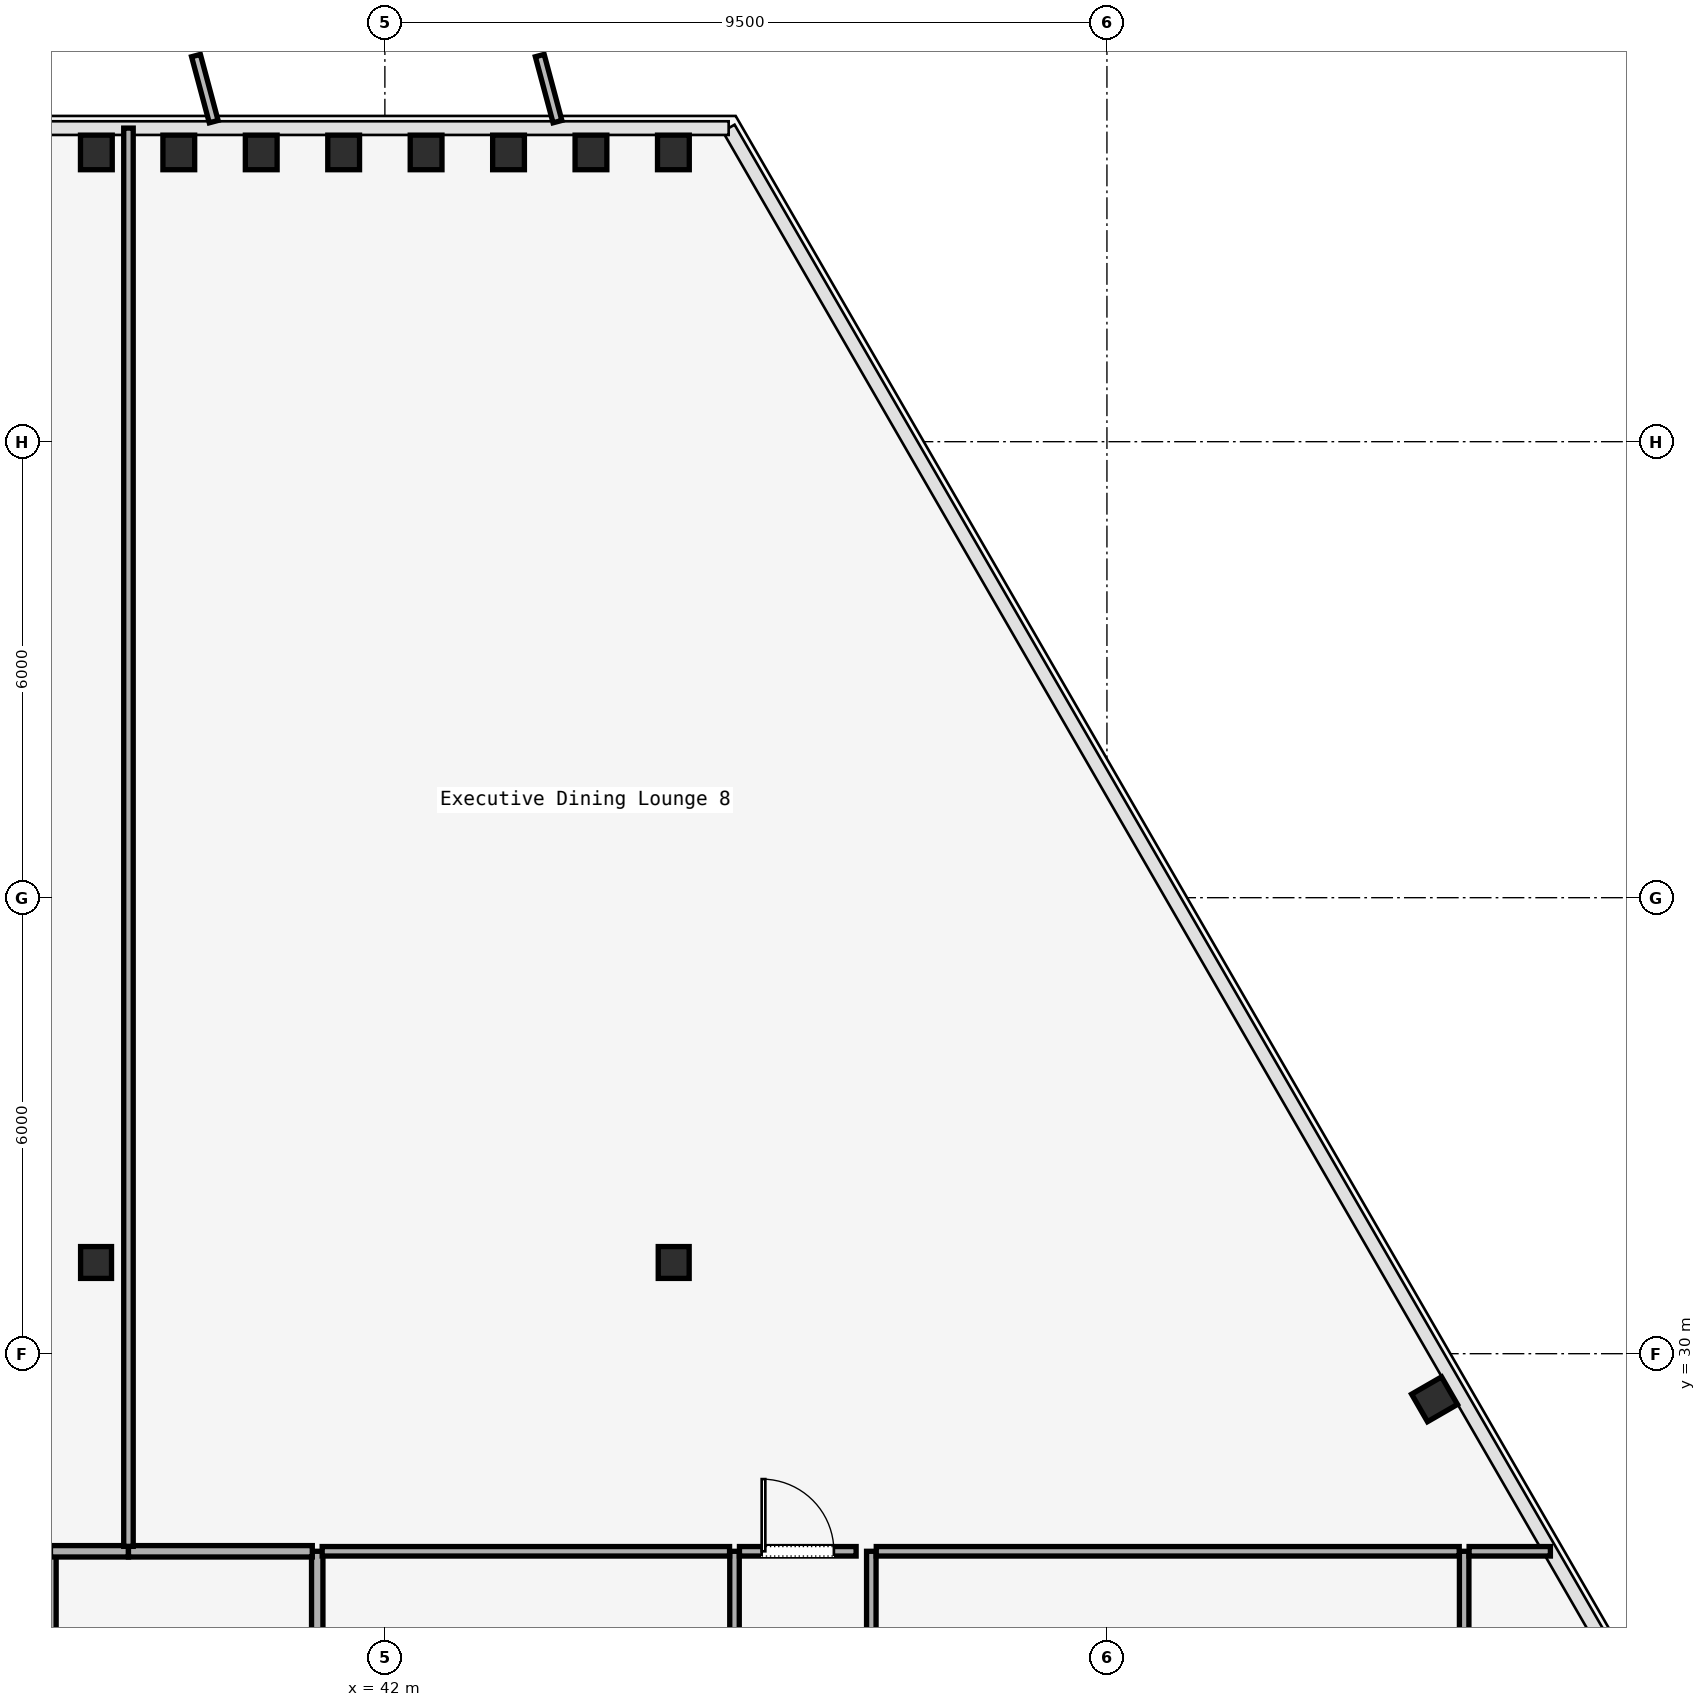
"""IFC4 building model, lengths in metres.
Left out: names, types, materials, properties, quantities, classifications, styles, units other than length and angle.
Written with IfcOpenShell. Run it as: python <this file> out.ifc"""

import sys

from ifc_helpers import new_model, si_unit, direction, frame, frame_2d, origin, origin_2d, place, context, subcontext, project, spatial, rectangle, i_section, extrude, element, fill, save


model = new_model("IFC4")
c1 = context("Model", 3, precision=1e-05, world=origin(), true_north=direction((0.0, 1.0)))
c2 = subcontext(c1, "Body", "Model", "MODEL_VIEW")
j1 = project(units=[si_unit("LENGTHUNIT", "METRE"), si_unit("PLANEANGLEUNIT", "RADIAN")], contexts=[c1])
p1 = place(None, origin())
s1 = spatial("IfcSite", under=j1, at=p1, CompositionType="ELEMENT")
p2 = place(p1, origin())
s2 = spatial("IfcBuilding", under=s1, at=p2, CompositionType="ELEMENT")
p3 = place(p2, frame((0.0, 0.0, 195.4)))
s3 = spatial("IfcBuildingStorey", under=s2, at=p3, CompositionType="ELEMENT", Elevation=195.4)
for number, where, z_axis, x_axis in (
    (1, (38.2, 31.2, 0.0), (0.0, 0.0, 1.0), (1.0, 0.0, 0.0)),
    (2, (45.8, 31.2, 0.0), (0.0, 0.0, 1.0), (1.0, 0.0, 0.0)),
):
    element("IfcColumn", number, at=place(p3, frame(where, z_axis=z_axis, x_axis=x_axis)), inside=s3, PredefinedType="COLUMN", context=c2, shape_type="SweptSolid", body=[
        extrude(i_section(OverallWidth=0.407, OverallDepth=0.419, WebThickness=0.031, FlangeThickness=0.049, FilletRadius=0.015, at=origin_2d()), origin(), (0.0, 0.0, 1.0), 3.58),
    ])
for number, where, z_axis, x_axis in (
    (3, (55.81, 29.4, 0.0), (0.0, 0.0, 1.0), (-0.5, 0.866, 0.0)),
    (4, (45.796, 45.806, 0.0), (0.0, 0.0, 1.0), (1.0, 0.0, 0.0)),
    (5, (44.711, 45.806, 0.0), (0.0, 0.0, 1.0), (1.0, 0.0, 0.0)),
    (6, (43.627, 45.806, 0.0), (0.0, 0.0, 1.0), (1.0, 0.0, 0.0)),
    (7, (42.542, 45.806, 0.0), (0.0, 0.0, 1.0), (1.0, 0.0, 0.0)),
    (8, (41.458, 45.806, 0.0), (0.0, 0.0, 1.0), (1.0, 0.0, 0.0)),
    (9, (40.373, 45.806, 0.0), (0.0, 0.0, 1.0), (1.0, 0.0, 0.0)),
    (10, (39.289, 45.806, 0.0), (0.0, 0.0, 1.0), (1.0, 0.0, 0.0)),
    (11, (38.204, 45.806, 0.0), (0.0, 0.0, 1.0), (1.0, 0.0, 0.0)),
):
    element("IfcColumn", number, at=place(p3, frame(where, z_axis=z_axis, x_axis=x_axis)), inside=s3, PredefinedType="COLUMN", context=c2, shape_type="SweptSolid", body=[
        extrude(i_section(OverallWidth=0.418, OverallDepth=0.455, WebThickness=0.042, FlangeThickness=0.052, FilletRadius=0.015, at=origin_2d()), origin(), (0.0, 0.0, 1.0), 3.58),
    ])
p4 = place(p3, frame((37.6, 27.335, 0.0), z_axis=(0.0, 0.0, 1.0), x_axis=(0.0, -1.0, 0.0)))
e12 = element("IfcWall", 12, at=p4, inside=s3, PredefinedType="PARTITIONING", context=c2, shape_type="SweptSolid", body=[
    extrude(rectangle(XDim=6.279, YDim=0.15, at=frame_2d((3.14, 0.0))), origin(), (0.0, 0.0, 1.0), 3.01),
])
p5 = place(p4, frame((2.665, 0.0, 0.0)))
e13 = element("IfcOpeningElement", 13, at=p5, cuts=e12, PredefinedType="OPENING", context=c2, shape_type="SweptSolid", body=[
    extrude(rectangle(XDim=0.95, YDim=2.2, at=frame_2d((0.475, 1.1))), frame((0.0, 0.075, 0.0), z_axis=(0.0, -1.0, 0.0), x_axis=(1.0, 0.0, 0.0)), (0.0, 0.0, 1.0), 0.15),
])
p6 = place(p3, frame((46.6, 23.53, 0.0), z_axis=(0.0, 0.0, 1.0), x_axis=(0.0, 1.0, 0.0)))
e14 = element("IfcWall", 14, at=p6, inside=s3, PredefinedType="PARTITIONING", context=c2, shape_type="SweptSolid", body=[
    extrude(rectangle(XDim=3.87, YDim=0.125, at=frame_2d((1.935, 0.0))), origin(), (0.0, 0.0, 1.0), 3.01),
])
p7 = place(p6, frame((1.46, 0.0, 0.0)))
e15 = element("IfcOpeningElement", 15, at=p7, cuts=e14, PredefinedType="OPENING", context=c2, shape_type="SweptSolid", body=[
    extrude(rectangle(XDim=0.95, YDim=2.2, at=frame_2d((0.475, 1.1))), frame((0.0, 0.062, 0.0), z_axis=(0.0, -1.0, 0.0), x_axis=(1.0, 0.0, 0.0)), (0.0, 0.0, 1.0), 0.125),
])
p8 = place(p3, frame((46.665, 27.4, 0.0), z_axis=(0.0, 0.0, 1.0), x_axis=(1.0, 0.0, 0.0)))
e16 = element("IfcWall", 16, at=p8, inside=s3, PredefinedType="PARTITIONING", context=c2, shape_type="SweptSolid", body=[
    extrude(rectangle(XDim=1.535, YDim=0.125, at=frame_2d((0.768, 0.0))), origin(), (0.0, 0.0, 1.0), 3.01),
])
p9 = place(p8, frame((0.292, 0.0, 0.0)))
e17 = element("IfcOpeningElement", 17, at=p9, cuts=e16, PredefinedType="OPENING", context=c2, shape_type="SweptSolid", body=[
    extrude(rectangle(XDim=0.95, YDim=2.2, at=frame_2d((0.475, 1.1))), frame((0.0, 0.062, 0.0), z_axis=(0.0, -1.0, 0.0), x_axis=(1.0, 0.0, 0.0)), (0.0, 0.0, 1.0), 0.125),
])
p10 = place(p3, frame((48.4, 27.4, 0.0), z_axis=(0.0, 0.0, 1.0), x_axis=(0.0, -1.0, 0.0)))
e18 = element("IfcWall", 18, at=p10, inside=s3, PredefinedType="PARTITIONING", context=c2, shape_type="SweptSolid", body=[
    extrude(rectangle(XDim=3.317, YDim=0.125, at=frame_2d((1.659, 0.0))), origin(), (0.0, 0.0, 1.0), 3.01),
])
p11 = place(p10, frame((1.184, 0.0, 0.0)))
e19 = element("IfcOpeningElement", 19, at=p11, cuts=e18, PredefinedType="OPENING", context=c2, shape_type="SweptSolid", body=[
    extrude(rectangle(XDim=0.95, YDim=2.2, at=frame_2d((0.475, 1.1))), frame((0.0, 0.062, 0.0), z_axis=(0.0, -1.0, 0.0), x_axis=(1.0, 0.0, 0.0)), (0.0, 0.0, 1.0), 0.125),
])
p12 = place(p3, frame((56.2, 24.083, 0.0), z_axis=(0.0, 0.0, 1.0), x_axis=(0.0, 1.0, 0.0)))
e20 = element("IfcWall", 20, at=p12, inside=s3, PredefinedType="PARTITIONING", context=c2, shape_type="SweptSolid", body=[
    extrude(rectangle(XDim=3.317, YDim=0.125, at=frame_2d((1.659, 0.0))), origin(), (0.0, 0.0, 1.0), 3.01),
])
p13 = place(p3, frame((56.265, 27.4, 0.0), z_axis=(0.0, 0.0, 1.0), x_axis=(1.0, 0.0, 0.0)))
e21 = element("IfcWall", 21, at=p13, inside=s3, PredefinedType="PARTITIONING", context=c2, shape_type="SweptSolid", body=[
    extrude(rectangle(XDim=1.07, YDim=0.125, at=frame_2d((0.535, 0.0))), origin(), (0.0, 0.0, 1.0), 3.01),
])
p14 = place(p3, frame((41.11, 27.4, 0.0), z_axis=(0.0, 0.0, 1.0), x_axis=(0.0, -1.0, 0.0)))
e22 = element("IfcWall", 22, at=p14, inside=s3, PredefinedType="PARTITIONING", context=c2, shape_type="SweptSolid", body=[
    extrude(rectangle(XDim=3.87, YDim=0.15, at=frame_2d((1.935, 0.0))), origin(), (0.0, 0.0, 1.0), 3.01),
])
p15 = place(p3, frame((37.6, 27.4, 0.0), z_axis=(0.0, 0.0, 1.0), x_axis=(1.0, 0.0, 0.0)))
e23 = element("IfcWall", 23, at=p15, inside=s3, PredefinedType="PARTITIONING", context=c2, shape_type="SweptSolid", body=[
    extrude(rectangle(XDim=1.026, YDim=0.15, at=frame_2d((0.513, 0.0))), origin(), (0.0, 0.0, 1.0), 3.01),
])
p16 = place(p3, frame((38.626, 27.4, 0.0), z_axis=(0.0, 0.0, 1.0), x_axis=(1.0, 0.0, 0.0)))
e24 = element("IfcWall", 24, at=p16, inside=s3, PredefinedType="PARTITIONING", context=c2, shape_type="SweptSolid", body=[
    extrude(rectangle(XDim=2.418, YDim=0.15, at=frame_2d((1.209, 0.0))), origin(), (0.0, 0.0, 1.0), 3.01),
])
p17 = place(p3, frame((41.175, 27.4, 0.0), z_axis=(0.0, 0.0, 1.0), x_axis=(1.0, 0.0, 0.0)))
e25 = element("IfcWall", 25, at=p17, inside=s3, PredefinedType="PARTITIONING", context=c2, shape_type="SweptSolid", body=[
    extrude(rectangle(XDim=5.36, YDim=0.125, at=frame_2d((2.68, 0.0))), origin(), (0.0, 0.0, 1.0), 3.01),
])
p18 = place(p3, frame((48.465, 27.4, 0.0), z_axis=(0.0, 0.0, 1.0), x_axis=(1.0, 0.0, 0.0)))
e26 = element("IfcWall", 26, at=p18, inside=s3, PredefinedType="PARTITIONING", context=c2, shape_type="SweptSolid", body=[
    extrude(rectangle(XDim=7.67, YDim=0.125, at=frame_2d((3.835, 0.0))), origin(), (0.0, 0.0, 1.0), 3.01),
])
p19 = place(p3, frame((38.626, 46.126, 0.0), z_axis=(0.0, 0.0, 1.0), x_axis=(0.0, -1.0, 0.0)))
e27 = element("IfcWall", 27, at=p19, inside=s3, PredefinedType="PARTITIONING", context=c2, shape_type="SweptSolid", body=[
    extrude(rectangle(XDim=18.661, YDim=0.125, at=frame_2d((9.331, 0.0))), origin(), (0.0, 0.0, 1.0), 3.01),
])
p20 = place(p9, origin())
e28 = element("IfcDoor", 28, at=p20, inside=s3, OperationType="SINGLE_SWING_RIGHT", PredefinedType="DOOR", context=c2, shape_type="SweptSolid", body=[
    extrude(rectangle(XDim=0.95, YDim=2.2, at=frame_2d((0.475, 1.1))), frame((0.0, 0.025, 0.0), z_axis=(0.0, -1.0, 0.0), x_axis=(1.0, 0.0, 0.0)), (0.0, 0.0, 1.0), 0.05),
])
fill(e17, e28)
save(model, sys.argv[1])
